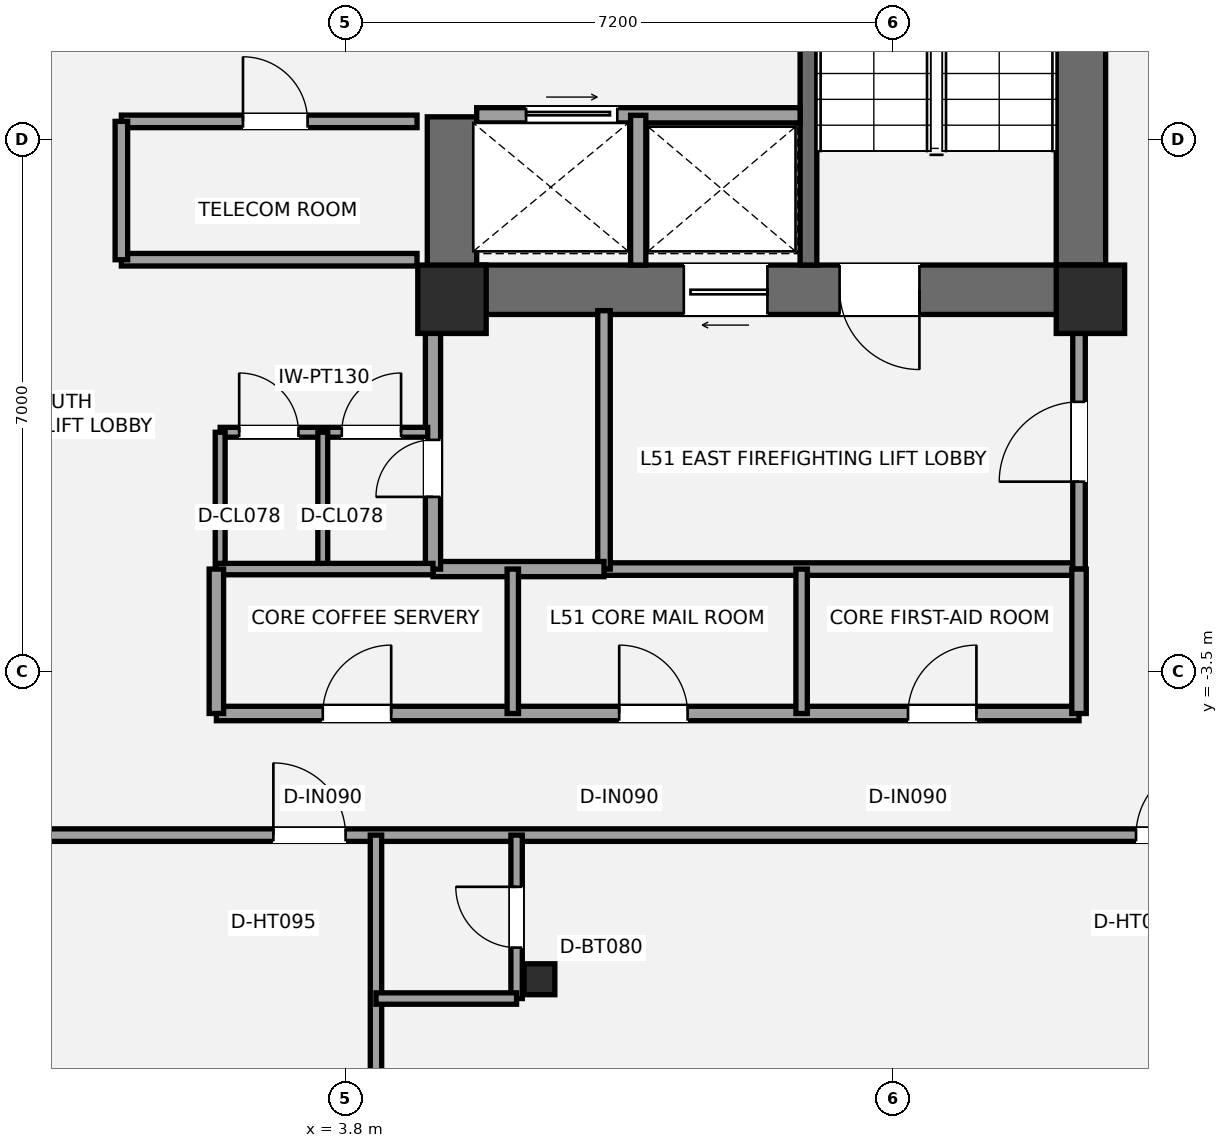
"""IFC4 building model, lengths in metres.
Left out: names, types, materials, properties, quantities, classifications, styles, units other than length and angle.
Written with IfcOpenShell. Run it as: python <this file> out.ifc"""

import sys

from ifc_helpers import new_model, si_unit, direction, frame, frame_2d, origin, origin_2d, place, context, subcontext, project, spatial, rectangle, i_section, extrude, element, fill, save


model = new_model("IFC4")
c1 = context("Model", 3, precision=1e-05, world=origin(), true_north=direction((0.0, 1.0)))
c2 = subcontext(c1, "Body", "Model", "MODEL_VIEW")
j1 = project(units=[si_unit("LENGTHUNIT", "METRE"), si_unit("PLANEANGLEUNIT", "RADIAN")], contexts=[c1])
p1 = place(None, origin())
s1 = spatial("IfcSite", under=j1, at=p1, CompositionType="ELEMENT")
p2 = place(p1, origin())
s2 = spatial("IfcBuilding", under=s1, at=p2, CompositionType="ELEMENT")
p3 = place(p2, frame((0.0, 0.0, 185.4)))
s3 = spatial("IfcBuildingStorey", under=s2, at=p3, CompositionType="ELEMENT", Elevation=185.4)
p4 = place(p3, frame((13.475, 1.2, 0.0), z_axis=(0.0, 0.0, 1.0), x_axis=(0.0, 1.0, 0.0)))
e1 = element("IfcWall", 1, at=p4, inside=s3, PredefinedType="SHEAR", context=c2, shape_type="SweptSolid", body=[
    extrude(rectangle(XDim=8.45, YDim=0.65, at=frame_2d((4.225, 0.0))), origin(), (0.0, 0.0, 1.0), 3.2),
])
p5 = place(p3, frame((13.8, 1.525, 0.0), z_axis=(0.0, 0.0, 1.0), x_axis=(-1.0, 0.0, 0.0)))
e2 = element("IfcWall", 2, at=p5, inside=s3, PredefinedType="SHEAR", context=c2, shape_type="SweptSolid", body=[
    extrude(rectangle(XDim=8.925, YDim=0.65, at=frame_2d((4.462, 0.0))), origin(), (0.0, 0.0, 1.0), 3.2),
])
p6 = place(p5, frame((2.45, 0.0, 0.0)))
e3 = element("IfcOpeningElement", 3, at=p6, cuts=e2, PredefinedType="OPENING", context=c2, shape_type="SweptSolid", body=[
    extrude(rectangle(XDim=1.05, YDim=2.15, at=frame_2d((0.525, 1.075))), frame((0.0, 0.335, 0.0), z_axis=(0.0, -1.0, 0.0), x_axis=(1.0, 0.0, 0.0)), (0.0, 0.0, 1.0), 0.67),
])
p7 = place(p5, frame((4.45, 0.0, 0.0)))
e4 = element("IfcOpeningElement", 4, at=p7, cuts=e2, PredefinedType="OPENING", context=c2, shape_type="SweptSolid", body=[
    extrude(rectangle(XDim=1.1, YDim=2.2, at=frame_2d((0.55, 1.1))), frame((0.0, 0.335, 0.0), z_axis=(0.0, -1.0, 0.0), x_axis=(1.0, 0.0, 0.0)), (0.0, 0.0, 1.0), 0.67),
])
p8 = place(p3, frame((5.2, 1.2, 0.0), z_axis=(0.0, 0.0, 1.0), x_axis=(0.0, 1.0, 0.0)))
e5 = element("IfcWall", 5, at=p8, inside=s3, PredefinedType="SHEAR", context=c2, shape_type="SweptSolid", body=[
    extrude(rectangle(XDim=2.6, YDim=0.65, at=frame_2d((1.3, 0.0))), origin(), (0.0, 0.0, 1.0), 3.2),
])
p9 = place(p3, frame((9.89, 1.85, 0.0), z_axis=(0.0, 0.0, 1.0), x_axis=(0.0, 1.0, 0.0)))
e6 = element("IfcWall", 6, at=p9, inside=s3, PredefinedType="SHEAR", context=c2, shape_type="SweptSolid", body=[
    extrude(rectangle(XDim=7.15, YDim=0.22, at=frame_2d((3.575, 0.0))), origin(), (0.0, 0.0, 1.0), 3.2),
])
for number, where, z_axis, x_axis in (
    (7, (5.2, 1.4, 0.0), (0.0, 0.0, 1.0), (1.0, 0.0, 0.0)),
    (8, (13.6, 1.4, 0.0), (0.0, 0.0, 1.0), (1.0, 0.0, 0.0)),
):
    element("IfcColumn", number, at=place(p3, frame(where, z_axis=z_axis, x_axis=x_axis)), inside=s3, PredefinedType="COLUMN", context=c2, shape_type="SweptSolid", body=[
        extrude(rectangle(XDim=0.9, YDim=0.9, at=origin_2d()), origin(), (0.0, 0.0, 1.0), 3.2),
    ])
p10 = place(p3, frame((6.351, -7.546, 0.0), z_axis=(0.0, 0.0, 1.0), x_axis=(1.0, 0.0, 0.0)))
e9 = element("IfcColumn", 9, at=p10, inside=s3, PredefinedType="COLUMN", context=c2, shape_type="SweptSolid", body=[
    extrude(i_section(OverallWidth=0.404, OverallDepth=0.407, WebThickness=0.027, FlangeThickness=0.044, at=origin_2d()), origin(), (0.0, 0.0, 1.0), 3.2),
])
p11 = place(p3, frame((7.2, -2.15, 0.0), z_axis=(0.0, 0.0, 1.0), x_axis=(1.0, 0.0, 0.0)))
e10 = element("IfcWall", 10, at=p11, inside=s3, PredefinedType="PARTITIONING", context=c2, shape_type="SweptSolid", body=[
    extrude(rectangle(XDim=6.25, YDim=0.165, at=frame_2d((3.125, 0.0))), origin(), (0.0, 0.0, 1.0), 3.02),
])
p12 = place(p3, frame((7.2, -2.15, 0.0), z_axis=(0.0, 0.0, 1.0), x_axis=(0.0, 1.0, 0.0)))
e11 = element("IfcWall", 11, at=p12, inside=s3, PredefinedType="PARTITIONING", context=c2, shape_type="SweptSolid", body=[
    extrude(rectangle(XDim=3.4, YDim=0.165, at=frame_2d((1.7, 0.0))), origin(), (0.0, 0.0, 1.0), 2.473),
])
p13 = place(p3, frame((13.45, -2.15, 0.0), z_axis=(0.0, 0.0, 1.0), x_axis=(0.0, 1.0, 0.0)))
e12 = element("IfcWall", 12, at=p13, inside=s3, PredefinedType="PARTITIONING", context=c2, shape_type="SweptSolid", body=[
    extrude(rectangle(XDim=3.4, YDim=0.165, at=frame_2d((1.7, 0.0))), origin(), (0.0, 0.0, 1.0), 2.473),
])
p14 = place(p13, frame((1.15, 0.0, 0.0)))
e13 = element("IfcOpeningElement", 13, at=p14, cuts=e12, PredefinedType="OPENING", context=c2, shape_type="SweptSolid", body=[
    extrude(rectangle(XDim=1.05, YDim=2.15, at=frame_2d((0.525, 1.075))), frame((0.0, 0.093, 0.0), z_axis=(0.0, -1.0, 0.0), x_axis=(1.0, 0.0, 0.0)), (0.0, 0.0, 1.0), 0.185),
])
p15 = place(p3, frame((4.95, -2.15, 0.0), z_axis=(0.0, 0.0, 1.0), x_axis=(1.0, 0.0, 0.0)))
e14 = element("IfcWall", 14, at=p15, inside=s3, PredefinedType="SOLIDWALL", context=c2, shape_type="SweptSolid", body=[
    extrude(rectangle(XDim=2.25, YDim=0.2, at=frame_2d((1.125, 0.0))), origin(), (0.0, 0.0, 1.0), 3.02),
])
p16 = place(p3, frame((4.95, -2.15, 0.0), z_axis=(0.0, 0.0, 1.0), x_axis=(0.0, 1.0, 0.0)))
e15 = element("IfcWall", 15, at=p16, inside=s3, PredefinedType="SOLIDWALL", context=c2, shape_type="SweptSolid", body=[
    extrude(rectangle(XDim=3.4, YDim=0.2, at=frame_2d((1.7, 0.0))), origin(), (0.0, 0.0, 1.0), 2.473),
])
p17 = place(p16, frame((0.95, 0.0, 0.0)))
e16 = element("IfcOpeningElement", 16, at=p17, cuts=e15, PredefinedType="OPENING", context=c2, shape_type="SweptSolid", body=[
    extrude(rectangle(XDim=0.75, YDim=2.1, at=frame_2d((0.375, 1.05))), frame((0.0, 0.11, 0.0), z_axis=(0.0, -1.0, 0.0), x_axis=(1.0, 0.0, 0.0)), (0.0, 0.0, 1.0), 0.22),
])
p18 = place(p3, frame((2.15, -0.35, 0.0), z_axis=(0.0, 0.0, 1.0), x_axis=(1.0, 0.0, 0.0)))
e17 = element("IfcWall", 17, at=p18, inside=s3, PredefinedType="PARTITIONING", context=c2, shape_type="SweptSolid", body=[
    extrude(rectangle(XDim=2.73, YDim=0.13, at=frame_2d((1.365, 0.0))), origin(), (0.0, 0.0, 1.0), 3.02),
])
p19 = place(p18, frame((0.25, 0.0, 0.0)))
e18 = element("IfcOpeningElement", 18, at=p19, cuts=e17, PredefinedType="OPENING", context=c2, shape_type="SweptSolid", body=[
    extrude(rectangle(XDim=0.78, YDim=2.1, at=frame_2d((0.39, 1.05))), frame((0.0, 0.075, 0.0), z_axis=(0.0, -1.0, 0.0), x_axis=(1.0, 0.0, 0.0)), (0.0, 0.0, 1.0), 0.15),
])
p20 = place(p18, frame((1.6, 0.0, 0.0)))
e19 = element("IfcOpeningElement", 19, at=p20, cuts=e17, PredefinedType="OPENING", context=c2, shape_type="SweptSolid", body=[
    extrude(rectangle(XDim=0.78, YDim=2.1, at=frame_2d((0.39, 1.05))), frame((0.0, 0.075, 0.0), z_axis=(0.0, -1.0, 0.0), x_axis=(1.0, 0.0, 0.0)), (0.0, 0.0, 1.0), 0.15),
])
for number, where, z_axis, x_axis in (
    (20, (2.15, -2.15, 0.0), (0.0, 0.0, 1.0), (0.0, 1.0, 0.0)),
    (21, (3.5, -2.15, 0.0), (0.0, 0.0, 1.0), (0.0, 1.0, 0.0)),
):
    element("IfcWall", number, at=place(p3, frame(where, z_axis=z_axis, x_axis=x_axis)), inside=s3, PredefinedType="PARTITIONING", context=c2, shape_type="SweptSolid", body=[
        extrude(rectangle(XDim=1.8, YDim=0.13, at=frame_2d((0.9, 0.0))), origin(), (0.0, 0.0, 1.0), 3.02),
    ])
p21 = place(p3, frame((5.525, 3.82, 0.0), z_axis=(0.0, 0.0, 1.0), x_axis=(1.0, 0.0, 0.0)))
e22 = element("IfcWall", 22, at=p21, inside=s3, PredefinedType="SOLIDWALL", context=c2, shape_type="SweptSolid", body=[
    extrude(rectangle(XDim=4.255, YDim=0.2, at=frame_2d((2.127, 0.0))), origin(), (0.0, 0.0, 1.0), 3.02),
])
p22 = place(p21, frame((0.65, 0.0, 0.0)))
e23 = element("IfcOpeningElement", 23, at=p22, cuts=e22, PredefinedType="OPENING", context=c2, shape_type="SweptSolid", body=[
    extrude(rectangle(XDim=1.2, YDim=2.2, at=frame_2d((0.6, 1.1))), frame((0.0, 0.11, 0.0), z_axis=(0.0, -1.0, 0.0), x_axis=(1.0, 0.0, 0.0)), (0.0, 0.0, 1.0), 0.22),
])
p23 = place(p3, frame((7.65, 1.85, 0.0), z_axis=(0.0, 0.0, 1.0), x_axis=(0.0, 1.0, 0.0)))
e24 = element("IfcWall", 24, at=p23, inside=s3, PredefinedType="SOLIDWALL", context=c2, shape_type="SweptSolid", body=[
    extrude(rectangle(XDim=1.97, YDim=0.2, at=frame_2d((0.985, 0.0))), origin(), (0.0, 0.0, 1.0), 3.02),
])
p24 = place(p3, frame((0.85, 1.92, 0.0), z_axis=(0.0, 0.0, 1.0), x_axis=(1.0, 0.0, 0.0)))
e25 = element("IfcWall", 25, at=p24, inside=s3, PredefinedType="PARTITIONING", context=c2, shape_type="SweptSolid", body=[
    extrude(rectangle(XDim=3.89, YDim=0.165, at=frame_2d((1.945, 0.0))), origin(), (0.0, 0.0, 1.0), 2.16),
])
p25 = place(p3, frame((0.85, 3.74, 0.0), z_axis=(0.0, 0.0, 1.0), x_axis=(1.0, 0.0, 0.0)))
e26 = element("IfcWall", 26, at=p25, inside=s3, PredefinedType="PARTITIONING", context=c2, shape_type="SweptSolid", body=[
    extrude(rectangle(XDim=3.89, YDim=0.165, at=frame_2d((1.945, 0.0))), origin(), (0.0, 0.0, 1.0), 3.02),
])
p26 = place(p25, frame((1.6, 0.0, 0.0)))
e27 = element("IfcOpeningElement", 27, at=p26, cuts=e26, PredefinedType="OPENING", context=c2, shape_type="SweptSolid", body=[
    extrude(rectangle(XDim=0.85, YDim=2.1, at=frame_2d((0.425, 1.05))), frame((0.0, 0.093, 0.0), z_axis=(0.0, -1.0, 0.0), x_axis=(1.0, 0.0, 0.0)), (0.0, 0.0, 1.0), 0.185),
])
p27 = place(p3, frame((0.85, 1.92, 0.0), z_axis=(0.0, 0.0, 1.0), x_axis=(0.0, 1.0, 0.0)))
e28 = element("IfcWall", 28, at=p27, inside=s3, PredefinedType="PARTITIONING", context=c2, shape_type="SweptSolid", body=[
    extrude(rectangle(XDim=1.82, YDim=0.165, at=frame_2d((0.91, 0.0))), origin(), (0.0, 0.0, 1.0), 3.02),
])
p28 = place(p3, frame((2.1, -4.05, 0.0), z_axis=(0.0, 0.0, 1.0), x_axis=(1.0, 0.0, 0.0)))
e29 = element("IfcWall", 29, at=p28, inside=s3, PredefinedType="PLUMBINGWALL", context=c2, shape_type="SweptSolid", body=[
    extrude(rectangle(XDim=11.35, YDim=0.19, at=frame_2d((5.675, 0.0))), origin(), (0.0, 0.0, 1.0), 2.555),
])
p29 = place(p28, frame((1.4, 0.0, 0.0)))
e30 = element("IfcOpeningElement", 30, at=p29, cuts=e29, PredefinedType="OPENING", context=c2, shape_type="SweptSolid", body=[
    extrude(rectangle(XDim=0.9, YDim=2.1, at=frame_2d((0.45, 1.05))), frame((0.0, 0.105, 0.0), z_axis=(0.0, -1.0, 0.0), x_axis=(1.0, 0.0, 0.0)), (0.0, 0.0, 1.0), 0.21),
])
p30 = place(p28, frame((5.3, 0.0, 0.0)))
e31 = element("IfcOpeningElement", 31, at=p30, cuts=e29, PredefinedType="OPENING", context=c2, shape_type="SweptSolid", body=[
    extrude(rectangle(XDim=0.9, YDim=2.1, at=frame_2d((0.45, 1.05))), frame((0.0, 0.105, 0.0), z_axis=(0.0, -1.0, 0.0), x_axis=(1.0, 0.0, 0.0)), (0.0, 0.0, 1.0), 0.21),
])
p31 = place(p28, frame((9.1, 0.0, 0.0)))
e32 = element("IfcOpeningElement", 32, at=p31, cuts=e29, PredefinedType="OPENING", context=c2, shape_type="SweptSolid", body=[
    extrude(rectangle(XDim=0.9, YDim=2.1, at=frame_2d((0.45, 1.05))), frame((0.0, 0.105, 0.0), z_axis=(0.0, -1.0, 0.0), x_axis=(1.0, 0.0, 0.0)), (0.0, 0.0, 1.0), 0.21),
])
p32 = place(p3, frame((2.1, -2.15, 0.0), z_axis=(0.0, 0.0, 1.0), x_axis=(1.0, 0.0, 0.0)))
e33 = element("IfcWall", 33, at=p32, inside=s3, PredefinedType="PLUMBINGWALL", context=c2, shape_type="SweptSolid", body=[
    extrude(rectangle(XDim=2.85, YDim=0.15, at=frame_2d((1.425, 0.0))), origin(), (0.0, 0.0, 1.0), 3.02),
])
p33 = place(p3, frame((2.1, -4.05, 0.0), z_axis=(0.0, 0.0, 1.0), x_axis=(0.0, 1.0, 0.0)))
e34 = element("IfcWall", 34, at=p33, inside=s3, PredefinedType="PLUMBINGWALL", context=c2, shape_type="SweptSolid", body=[
    extrude(rectangle(XDim=1.9, YDim=0.19, at=frame_2d((0.95, 0.0))), origin(), (0.0, 0.0, 1.0), 3.02),
])
p34 = place(p3, frame((13.45, -4.05, 0.0), z_axis=(0.0, 0.0, 1.0), x_axis=(0.0, 1.0, 0.0)))
e35 = element("IfcWall", 35, at=p34, inside=s3, PredefinedType="PLUMBINGWALL", context=c2, shape_type="SweptSolid", body=[
    extrude(rectangle(XDim=1.9, YDim=0.19, at=frame_2d((0.95, 0.0))), origin(), (0.0, 0.0, 1.0), 2.473),
])
for number, where, z_axis, x_axis in (
    (36, (6.0, -4.05, 0.0), (0.0, 0.0, 1.0), (0.0, 1.0, 0.0)),
    (37, (9.8, -4.05, 0.0), (0.0, 0.0, 1.0), (0.0, 1.0, 0.0)),
):
    element("IfcWall", number, at=place(p3, frame(where, z_axis=z_axis, x_axis=x_axis)), inside=s3, PredefinedType="PLUMBINGWALL", context=c2, shape_type="SweptSolid", body=[
        extrude(rectangle(XDim=1.9, YDim=0.15, at=frame_2d((0.95, 0.0))), origin(), (0.0, 0.0, 1.0), 2.473),
    ])
p35 = place(p3, frame((-16.1, -5.65, 0.0), z_axis=(0.0, 0.0, 1.0), x_axis=(1.0, 0.0, 0.0)))
e38 = element("IfcWall", 38, at=p35, inside=s3, PredefinedType="PARTITIONING", context=c2, shape_type="SweptSolid", body=[
    extrude(rectangle(XDim=31.65, YDim=0.165, at=frame_2d((15.825, 0.0))), origin(), (0.0, 0.0, 1.0), 2.398),
])
p36 = place(p35, frame((8.95, 0.0, 0.0)))
e39 = element("IfcOpeningElement", 39, at=p36, cuts=e38, PredefinedType="OPENING", context=c2, shape_type="SweptSolid", body=[
    extrude(rectangle(XDim=0.95, YDim=2.15, at=frame_2d((0.475, 1.075))), frame((0.0, 0.093, 0.0), z_axis=(0.0, -1.0, 0.0), x_axis=(1.0, 0.0, 0.0)), (0.0, 0.0, 1.0), 0.185),
])
p37 = place(p35, frame((18.95, 0.0, 0.0)))
e40 = element("IfcOpeningElement", 40, at=p37, cuts=e38, PredefinedType="OPENING", context=c2, shape_type="SweptSolid", body=[
    extrude(rectangle(XDim=0.95, YDim=2.15, at=frame_2d((0.475, 1.075))), frame((0.0, 0.093, 0.0), z_axis=(0.0, -1.0, 0.0), x_axis=(1.0, 0.0, 0.0)), (0.0, 0.0, 1.0), 0.185),
])
p38 = place(p35, frame((30.3, 0.0, 0.0)))
e41 = element("IfcOpeningElement", 41, at=p38, cuts=e38, PredefinedType="OPENING", context=c2, shape_type="SweptSolid", body=[
    extrude(rectangle(XDim=0.95, YDim=2.15, at=frame_2d((0.475, 1.075))), frame((0.0, 0.093, 0.0), z_axis=(0.0, -1.0, 0.0), x_axis=(1.0, 0.0, 0.0)), (0.0, 0.0, 1.0), 0.185),
])
p39 = place(p3, frame((4.2, -16.052, 0.0), z_axis=(0.0, 0.0, 1.0), x_axis=(0.0, 1.0, 0.0)))
e42 = element("IfcWall", 42, at=p39, inside=s3, PredefinedType="PLUMBINGWALL", context=c2, shape_type="SweptSolid", body=[
    extrude(rectangle(XDim=10.402, YDim=0.15, at=frame_2d((5.201, 0.0))), origin(), (0.0, 0.0, 1.0), 2.473),
])
p40 = place(p3, frame((6.05, -7.8, 0.0), z_axis=(0.0, 0.0, 1.0), x_axis=(0.0, 1.0, 0.0)))
e43 = element("IfcWall", 43, at=p40, inside=s3, PredefinedType="PLUMBINGWALL", context=c2, shape_type="SweptSolid", body=[
    extrude(rectangle(XDim=2.15, YDim=0.15, at=frame_2d((1.075, 0.0))), origin(), (0.0, 0.0, 1.0), 2.473),
])
p41 = place(p40, frame((0.67, 0.0, 0.0)))
e44 = element("IfcOpeningElement", 44, at=p41, cuts=e43, PredefinedType="OPENING", context=c2, shape_type="SweptSolid", body=[
    extrude(rectangle(XDim=0.8, YDim=2.1, at=frame_2d((0.4, 1.05))), frame((0.0, 0.085, 0.0), z_axis=(0.0, -1.0, 0.0), x_axis=(1.0, 0.0, 0.0)), (0.0, 0.0, 1.0), 0.17),
])
p42 = place(p3, frame((4.2, -7.8, 0.0), z_axis=(0.0, 0.0, 1.0), x_axis=(1.0, 0.0, 0.0)))
e45 = element("IfcWall", 45, at=p42, inside=s3, PredefinedType="PLUMBINGWALL", context=c2, shape_type="SweptSolid", body=[
    extrude(rectangle(XDim=1.85, YDim=0.15, at=frame_2d((0.925, 0.0))), origin(), (0.0, 0.0, 1.0), 3.02),
])
p43 = place(p6, origin())
e46 = element("IfcDoor", 46, at=p43, inside=s3, OperationType="SINGLE_SWING_LEFT", PredefinedType="DOOR", context=c2, shape_type="SweptSolid", body=[
    extrude(rectangle(XDim=1.05, YDim=2.15, at=frame_2d((0.525, 1.075))), frame((0.0, 0.025, 0.0), z_axis=(0.0, -1.0, 0.0), x_axis=(1.0, 0.0, 0.0)), (0.0, 0.0, 1.0), 0.05),
])
fill(e3, e46)
p44 = place(p14, origin())
e47 = element("IfcDoor", 47, at=p44, inside=s3, OperationType="SINGLE_SWING_LEFT", PredefinedType="DOOR", context=c2, shape_type="SweptSolid", body=[
    extrude(rectangle(XDim=1.05, YDim=2.15, at=frame_2d((0.525, 1.075))), frame((0.0, 0.025, 0.0), z_axis=(0.0, -1.0, 0.0), x_axis=(1.0, 0.0, 0.0)), (0.0, 0.0, 1.0), 0.05),
])
fill(e13, e47)
p45 = place(p17, origin())
e48 = element("IfcDoor", 48, at=p45, inside=s3, OperationType="SINGLE_SWING_LEFT", PredefinedType="DOOR", context=c2, shape_type="SweptSolid", body=[
    extrude(rectangle(XDim=0.75, YDim=2.1, at=frame_2d((0.375, 1.05))), frame((0.0, 0.025, 0.0), z_axis=(0.0, -1.0, 0.0), x_axis=(1.0, 0.0, 0.0)), (0.0, 0.0, 1.0), 0.05),
])
fill(e16, e48)
p46 = place(p19, origin())
e49 = element("IfcDoor", 49, at=p46, inside=s3, OperationType="SINGLE_SWING_LEFT", PredefinedType="DOOR", context=c2, shape_type="SweptSolid", body=[
    extrude(rectangle(XDim=0.78, YDim=2.1, at=frame_2d((0.39, 1.05))), frame((0.0, 0.025, 0.0), z_axis=(0.0, -1.0, 0.0), x_axis=(1.0, 0.0, 0.0)), (0.0, 0.0, 1.0), 0.05),
])
fill(e18, e49)
p47 = place(p20, origin())
e50 = element("IfcDoor", 50, at=p47, inside=s3, OperationType="SINGLE_SWING_RIGHT", PredefinedType="DOOR", context=c2, shape_type="SweptSolid", body=[
    extrude(rectangle(XDim=0.78, YDim=2.1, at=frame_2d((0.39, 1.05))), frame((0.0, 0.025, 0.0), z_axis=(0.0, -1.0, 0.0), x_axis=(1.0, 0.0, 0.0)), (0.0, 0.0, 1.0), 0.05),
])
fill(e19, e50)
p48 = place(p7, origin())
e51 = element("IfcDoor", 51, at=p48, inside=s3, OperationType="SLIDING_TO_LEFT", PredefinedType="DOOR", context=c2, shape_type="SweptSolid", body=[
    extrude(rectangle(XDim=1.1, YDim=2.2, at=frame_2d((0.55, 1.1))), frame((0.0, 0.025, 0.0), z_axis=(0.0, -1.0, 0.0), x_axis=(1.0, 0.0, 0.0)), (0.0, 0.0, 1.0), 0.05),
])
fill(e4, e51)
p49 = place(p22, origin())
e52 = element("IfcDoor", 52, at=p49, inside=s3, OperationType="SLIDING_TO_RIGHT", PredefinedType="DOOR", context=c2, shape_type="SweptSolid", body=[
    extrude(rectangle(XDim=1.2, YDim=2.2, at=frame_2d((0.6, 1.1))), frame((0.0, 0.025, 0.0), z_axis=(0.0, -1.0, 0.0), x_axis=(1.0, 0.0, 0.0)), (0.0, 0.0, 1.0), 0.05),
])
fill(e23, e52)
p50 = place(p26, origin())
e53 = element("IfcDoor", 53, at=p50, inside=s3, OperationType="SINGLE_SWING_LEFT", PredefinedType="DOOR", context=c2, shape_type="SweptSolid", body=[
    extrude(rectangle(XDim=0.85, YDim=2.1, at=frame_2d((0.425, 1.05))), frame((0.0, 0.025, 0.0), z_axis=(0.0, -1.0, 0.0), x_axis=(1.0, 0.0, 0.0)), (0.0, 0.0, 1.0), 0.05),
])
fill(e27, e53)
p51 = place(p29, origin())
e54 = element("IfcDoor", 54, at=p51, inside=s3, OperationType="SINGLE_SWING_RIGHT", PredefinedType="DOOR", context=c2, shape_type="SweptSolid", body=[
    extrude(rectangle(XDim=0.9, YDim=2.1, at=frame_2d((0.45, 1.05))), frame((0.0, 0.025, 0.0), z_axis=(0.0, -1.0, 0.0), x_axis=(1.0, 0.0, 0.0)), (0.0, 0.0, 1.0), 0.05),
])
fill(e30, e54)
p52 = place(p30, origin())
e55 = element("IfcDoor", 55, at=p52, inside=s3, OperationType="SINGLE_SWING_LEFT", PredefinedType="DOOR", context=c2, shape_type="SweptSolid", body=[
    extrude(rectangle(XDim=0.9, YDim=2.1, at=frame_2d((0.45, 1.05))), frame((0.0, 0.025, 0.0), z_axis=(0.0, -1.0, 0.0), x_axis=(1.0, 0.0, 0.0)), (0.0, 0.0, 1.0), 0.05),
])
fill(e31, e55)
p53 = place(p31, origin())
e56 = element("IfcDoor", 56, at=p53, inside=s3, OperationType="SINGLE_SWING_RIGHT", PredefinedType="DOOR", context=c2, shape_type="SweptSolid", body=[
    extrude(rectangle(XDim=0.9, YDim=2.1, at=frame_2d((0.45, 1.05))), frame((0.0, 0.025, 0.0), z_axis=(0.0, -1.0, 0.0), x_axis=(1.0, 0.0, 0.0)), (0.0, 0.0, 1.0), 0.05),
])
fill(e32, e56)
p54 = place(p37, origin())
e57 = element("IfcDoor", 57, at=p54, inside=s3, OperationType="SINGLE_SWING_LEFT", PredefinedType="DOOR", context=c2, shape_type="SweptSolid", body=[
    extrude(rectangle(XDim=0.95, YDim=2.15, at=frame_2d((0.475, 1.075))), frame((0.0, 0.025, 0.0), z_axis=(0.0, -1.0, 0.0), x_axis=(1.0, 0.0, 0.0)), (0.0, 0.0, 1.0), 0.05),
])
fill(e40, e57)
p55 = place(p38, origin())
e58 = element("IfcDoor", 58, at=p55, inside=s3, OperationType="SINGLE_SWING_RIGHT", PredefinedType="DOOR", context=c2, shape_type="SweptSolid", body=[
    extrude(rectangle(XDim=0.95, YDim=2.15, at=frame_2d((0.475, 1.075))), frame((0.0, 0.025, 0.0), z_axis=(0.0, -1.0, 0.0), x_axis=(1.0, 0.0, 0.0)), (0.0, 0.0, 1.0), 0.05),
])
fill(e41, e58)
p56 = place(p41, origin())
e59 = element("IfcDoor", 59, at=p56, inside=s3, OperationType="SINGLE_SWING_RIGHT", PredefinedType="DOOR", context=c2, shape_type="SweptSolid", body=[
    extrude(rectangle(XDim=0.8, YDim=2.1, at=frame_2d((0.4, 1.05))), frame((0.0, 0.025, 0.0), z_axis=(0.0, -1.0, 0.0), x_axis=(1.0, 0.0, 0.0)), (0.0, 0.0, 1.0), 0.05),
])
fill(e44, e59)
save(model, sys.argv[1])
